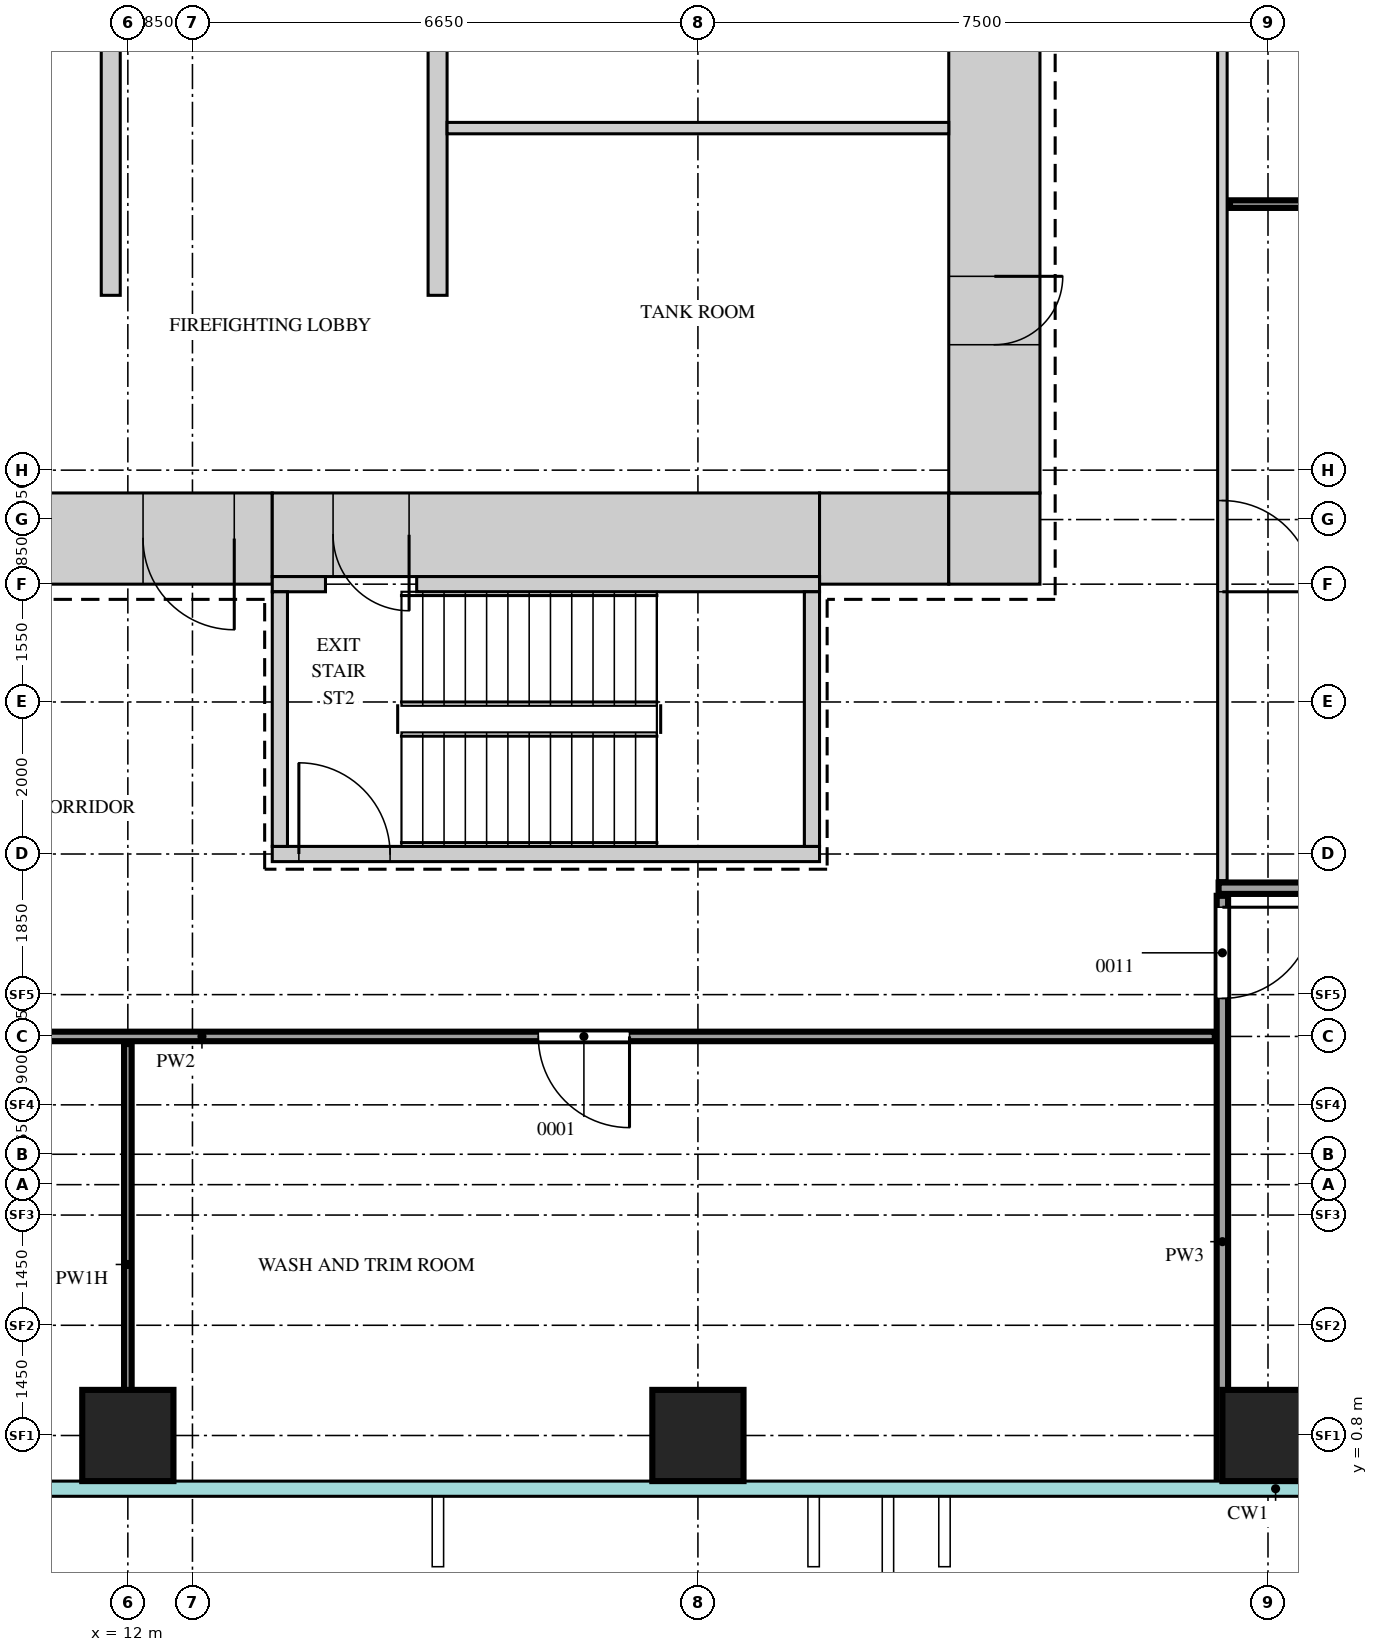
"""IFC4 building model, lengths in metres.
Left out: names, types, materials, properties, quantities, classifications, styles, units other than length and angle.
Written with IfcOpenShell. Run it as: python <this file> out.ifc"""

import sys

from ifc_helpers import new_model, si_unit, direction, frame, frame_2d, origin, origin_2d, place, context, subcontext, project, spatial, rectangle, extrude, source, transform, mapped, element, fill, save


model = new_model("IFC4")
c1 = context("Model", 3, precision=1e-05, world=origin(), true_north=direction((0.0, 1.0)))
c2 = subcontext(c1, "Body", "Model", "MODEL_VIEW")
j1 = project(units=[si_unit("LENGTHUNIT", "METRE"), si_unit("PLANEANGLEUNIT", "RADIAN")], contexts=[c1])
p1 = place(None, origin())
s1 = spatial("IfcSite", under=j1, at=p1, CompositionType="ELEMENT")
p2 = place(p1, origin())
s2 = spatial("IfcBuilding", under=s1, at=p2, CompositionType="ELEMENT")
p3 = place(p2, frame((0.0, 0.0, 33.0)))
s3 = spatial("IfcBuildingStorey", under=s2, at=p3, CompositionType="ELEMENT", Elevation=33.0)
m1 = source(origin(), c2, "Body", "SweptSolid", [
    extrude(rectangle(XDim=6.7, YDim=1.2, at=frame_2d((3.35, 0.0))), origin(), (0.0, 0.0, 1.0), 4.2),
])
p4 = place(p3, frame((7.2, 12.6, 0.0), z_axis=(0.0, 0.0, 1.0), x_axis=(1.0, 0.0, 0.0)))
e1 = element("IfcWall", 1, at=p4, inside=s3, PredefinedType="SHEAR", context=c2, shape_type="MappedRepresentation", body=[
    mapped(m1, transform((0.0, 0.0, 0.0))),
])
m2 = source(origin(), c2, "Body", "SweptSolid", [
    extrude(rectangle(XDim=1.2, YDim=2.1, at=frame_2d((0.6, 1.05))), frame((0.0, 0.61, 0.0), z_axis=(0.0, -1.0, 0.0), x_axis=(1.0, 0.0, 0.0)), (0.0, 0.0, 1.0), 1.22),
])
p5 = place(p4, frame((5.0, 0.0, 0.0)))
e2 = element("IfcOpeningElement", 2, at=p5, cuts=e1, PredefinedType="OPENING", context=c2, shape_type="MappedRepresentation", body=[
    mapped(m2, transform((0.0, 0.0, 0.0))),
])
p6 = place(p4, frame((1.65, 0.0, 0.0)))
e3 = element("IfcOpeningElement", 3, at=p6, cuts=e1, PredefinedType="OPENING", context=c2, shape_type="MappedRepresentation", body=[
    mapped(m2, transform((0.0, 0.0, 0.0))),
])
m3 = source(origin(), c2, "Body", "SweptSolid", [
    extrude(rectangle(XDim=7.2, YDim=1.1, at=frame_2d((3.6, 0.0))), origin(), (0.0, 0.0, 1.0), 4.2),
])
p7 = place(p3, frame((13.9, 12.65, 0.0), z_axis=(0.0, 0.0, 1.0), x_axis=(1.0, 0.0, 0.0)))
e4 = element("IfcWall", 4, at=p7, inside=s3, PredefinedType="SHEAR", context=c2, shape_type="MappedRepresentation", body=[
    mapped(m3, transform((0.0, 0.0, 0.0))),
])
m4 = source(origin(), c2, "Body", "SweptSolid", [
    extrude(rectangle(XDim=1.0, YDim=2.1, at=frame_2d((0.5, 1.05))), frame((0.0, 0.56, 0.0), z_axis=(0.0, -1.0, 0.0), x_axis=(1.0, 0.0, 0.0)), (0.0, 0.0, 1.0), 1.12),
])
p8 = place(p7, frame((0.8, 0.0, 0.0)))
e5 = element("IfcOpeningElement", 5, at=p8, cuts=e4, PredefinedType="OPENING", context=c2, shape_type="MappedRepresentation", body=[
    mapped(m4, transform((0.0, 0.0, 0.0))),
])
m5 = source(origin(), c2, "Body", "SweptSolid", [
    extrude(rectangle(XDim=1.7, YDim=1.2, at=frame_2d((0.85, 0.0))), origin(), (0.0, 0.0, 1.0), 4.2),
])
p9 = place(p3, frame((21.1, 12.6, 0.0), z_axis=(0.0, 0.0, 1.0), x_axis=(1.0, 0.0, 0.0)))
e6 = element("IfcWall", 6, at=p9, inside=s3, PredefinedType="SHEAR", context=c2, shape_type="MappedRepresentation", body=[
    mapped(m5, transform((0.0, 0.0, 0.0))),
])
m6 = source(origin(), c2, "Body", "SweptSolid", [
    extrude(rectangle(XDim=1.2, YDim=1.2, at=frame_2d((0.6, 0.0))), origin(), (0.0, 0.0, 1.0), 4.2),
])
p10 = place(p3, frame((22.8, 12.6, 0.0), z_axis=(0.0, 0.0, 1.0), x_axis=(1.0, 0.0, 0.0)))
e7 = element("IfcWall", 7, at=p10, inside=s3, PredefinedType="SHEAR", context=c2, shape_type="MappedRepresentation", body=[
    mapped(m6, transform((0.0, 0.0, 0.0))),
])
m7 = source(origin(), c2, "Body", "SweptSolid", [
    extrude(rectangle(XDim=27.6, YDim=1.2, at=frame_2d((13.8, 0.0))), origin(), (0.0, 0.0, 1.0), 4.2),
])
p11 = place(p3, frame((23.4, 13.2, 0.0), z_axis=(0.0, 0.0, 1.0), x_axis=(0.0, 1.0, 0.0)))
e8 = element("IfcWall", 8, at=p11, inside=s3, PredefinedType="SHEAR", context=c2, shape_type="MappedRepresentation", body=[
    mapped(m7, transform((0.0, 0.0, 0.0))),
])
m8 = source(origin(), c2, "Body", "SweptSolid", [
    extrude(rectangle(XDim=1.8, YDim=2.1, at=frame_2d((0.9, 1.05))), frame((0.0, 0.61, 0.0), z_axis=(0.0, -1.0, 0.0), x_axis=(1.0, 0.0, 0.0)), (0.0, 0.0, 1.0), 1.22),
])
p12 = place(p11, frame((22.4, 0.0, 0.0)))
e9 = element("IfcOpeningElement", 9, at=p12, cuts=e8, PredefinedType="OPENING", context=c2, shape_type="MappedRepresentation", body=[
    mapped(m8, transform((0.0, 0.0, 0.0))),
])
p13 = place(p11, frame((13.65, 0.0, 0.0)))
e10 = element("IfcOpeningElement", 10, at=p13, cuts=e8, PredefinedType="OPENING", context=c2, shape_type="MappedRepresentation", body=[
    mapped(m2, transform((0.0, 0.0, 0.0))),
])
m9 = source(origin(), c2, "Body", "SweptSolid", [
    extrude(rectangle(XDim=0.9, YDim=2.1, at=frame_2d((0.45, 1.05))), frame((0.0, 0.61, 0.0), z_axis=(0.0, -1.0, 0.0), x_axis=(1.0, 0.0, 0.0)), (0.0, 0.0, 1.0), 1.22),
])
p14 = place(p11, frame((1.95, 0.0, 0.0)))
e11 = element("IfcOpeningElement", 11, at=p14, cuts=e8, PredefinedType="OPENING", context=c2, shape_type="MappedRepresentation", body=[
    mapped(m9, transform((0.0, 0.0, 0.0))),
])
p15 = place(p11, frame((6.8, 0.0, 0.0)))
e12 = element("IfcOpeningElement", 12, at=p15, cuts=e8, PredefinedType="OPENING", context=c2, shape_type="MappedRepresentation", body=[
    mapped(m9, transform((0.0, 0.0, 0.0))),
])
m10 = source(origin(), c2, "Body", "SweptSolid", [
    extrude(rectangle(XDim=0.7, YDim=0.2, at=frame_2d((0.35, 0.0))), origin(), (0.0, 0.0, 1.0), 4.2),
])
p16 = place(p3, frame((13.9, 12.0, 0.0), z_axis=(0.0, 0.0, 1.0), x_axis=(1.0, 0.0, 0.0)))
e13 = element("IfcWall", 13, at=p16, inside=s3, PredefinedType="SHEAR", context=c2, shape_type="MappedRepresentation", body=[
    mapped(m10, transform((0.0, 0.0, 0.0))),
])
m11 = source(origin(), c2, "Body", "SweptSolid", [
    extrude(rectangle(XDim=5.3, YDim=0.2, at=frame_2d((2.65, 0.0))), origin(), (0.0, 0.0, 1.0), 4.2),
])
p17 = place(p3, frame((15.8, 12.0, 0.0), z_axis=(0.0, 0.0, 1.0), x_axis=(1.0, 0.0, 0.0)))
e14 = element("IfcWall", 14, at=p17, inside=s3, PredefinedType="SHEAR", context=c2, shape_type="MappedRepresentation", body=[
    mapped(m11, transform((0.0, 0.0, 0.0))),
])
m12 = source(origin(), c2, "Body", "SweptSolid", [
    extrude(rectangle(XDim=7.2, YDim=0.2, at=frame_2d((3.6, 0.0))), origin(), (0.0, 0.0, 1.0), 4.2),
])
p18 = place(p3, frame((13.9, 8.45, 0.0), z_axis=(0.0, 0.0, 1.0), x_axis=(1.0, 0.0, 0.0)))
e15 = element("IfcWall", 15, at=p18, inside=s3, PredefinedType="SHEAR", context=c2, shape_type="MappedRepresentation", body=[
    mapped(m12, transform((0.0, 0.0, 0.0))),
])
m13 = source(origin(), c2, "Body", "SweptSolid", [
    extrude(rectangle(XDim=1.2, YDim=2.1, at=frame_2d((0.6, 1.05))), frame((0.0, 0.11, 0.0), z_axis=(0.0, -1.0, 0.0), x_axis=(1.0, 0.0, 0.0)), (0.0, 0.0, 1.0), 0.22),
])
p19 = place(p18, frame((0.35, 0.0, 0.0)))
e16 = element("IfcOpeningElement", 16, at=p19, cuts=e15, PredefinedType="OPENING", context=c2, shape_type="MappedRepresentation", body=[
    mapped(m13, transform((0.0, 0.0, 0.0))),
])
m14 = source(origin(), c2, "Body", "SweptSolid", [
    extrude(rectangle(XDim=3.35, YDim=0.2, at=frame_2d((1.675, 0.0))), origin(), (0.0, 0.0, 1.0), 4.2),
])
for number, where, z_axis, x_axis in (
    (17, (21.0, 8.55, 0.0), (0.0, 0.0, 1.0), (0.0, 1.0, 0.0)),
    (18, (14.0, 8.55, 0.0), (0.0, 0.0, 1.0), (0.0, 1.0, 0.0)),
):
    element("IfcWall", number, at=place(p3, frame(where, z_axis=z_axis, x_axis=x_axis)), inside=s3, PredefinedType="SHEAR", context=c2, shape_type="MappedRepresentation", body=[
        mapped(m14, transform((0.0, 0.0, 0.0))),
    ])
m15 = source(origin(), c2, "Body", "SweptSolid", [
    extrude(rectangle(XDim=3.4, YDim=0.25, at=frame_2d((1.7, 0.0))), origin(), (0.0, 0.0, 1.0), 4.2),
])
for number, where, z_axis, x_axis in (
    (19, (16.075, 15.8, 0.0), (0.0, 0.0, 1.0), (0.0, 1.0, 0.0)),
    (20, (11.775, 15.8, 0.0), (0.0, 0.0, 1.0), (0.0, 1.0, 0.0)),
):
    element("IfcWall", number, at=place(p3, frame(where, z_axis=z_axis, x_axis=x_axis)), inside=s3, PredefinedType="STANDARD", context=c2, shape_type="MappedRepresentation", body=[
        mapped(m15, transform((0.0, 0.0, 0.0))),
    ])
m16 = source(origin(), c2, "Body", "SweptSolid", [
    extrude(rectangle(XDim=1.2, YDim=1.2, at=origin_2d()), origin(), (0.0, 0.0, 1.0), 4.2),
])
for number, where, z_axis, x_axis in (
    (21, (12.0, 0.8, 0.0), (0.0, 0.0, 1.0), (1.0, 0.0, 0.0)),
    (22, (19.5, 0.8, 0.0), (0.0, 0.0, 1.0), (1.0, 0.0, 0.0)),
    (23, (27.0, 0.8, 0.0), (0.0, 0.0, 1.0), (1.0, 0.0, 0.0)),
):
    element("IfcColumn", number, at=place(p3, frame(where, z_axis=z_axis, x_axis=x_axis)), inside=s3, PredefinedType="COLUMN", context=c2, shape_type="MappedRepresentation", body=[
        mapped(m16, transform((0.0, 0.0, 0.0))),
    ])
m17 = source(origin(), c2, "Body", "SweptSolid", [
    extrude(rectangle(XDim=5.8, YDim=0.1, at=frame_2d((2.9, 0.0))), origin(), (0.0, 0.0, 1.0), 3.7),
])
p20 = place(p3, frame((12.0, 0.15, 0.0), z_axis=(0.0, 0.0, 1.0), x_axis=(0.0, 1.0, 0.0)))
e24 = element("IfcWall", 24, at=p20, inside=s3, PredefinedType="PARTITIONING", context=c2, shape_type="MappedRepresentation", body=[
    mapped(m17, transform((0.0, 0.0, 0.0))),
])
m18 = source(origin(), c2, "Body", "SweptSolid", [
    extrude(rectangle(XDim=7.75, YDim=0.15, at=frame_2d((3.875, 0.0))), origin(), (0.0, 0.0, 1.0), 4.3),
])
p21 = place(p3, frame((26.4, 0.15, 0.0), z_axis=(0.0, 0.0, 1.0), x_axis=(0.0, 1.0, 0.0)))
e25 = element("IfcWall", 25, at=p21, inside=s3, PredefinedType="PARTITIONING", context=c2, shape_type="MappedRepresentation", body=[
    mapped(m18, transform((0.0, 0.0, 0.0))),
])
m19 = source(origin(), c2, "Body", "SweptSolid", [
    extrude(rectangle(XDim=1.2, YDim=2.1, at=frame_2d((0.6, 1.05))), frame((0.0, 0.085, 0.0), z_axis=(0.0, -1.0, 0.0), x_axis=(1.0, 0.0, 0.0)), (0.0, 0.0, 1.0), 0.17),
])
p22 = place(p21, frame((6.4, 0.0, 0.0)))
e26 = element("IfcOpeningElement", 26, at=p22, cuts=e25, PredefinedType="OPENING", context=c2, shape_type="MappedRepresentation", body=[
    mapped(m19, transform((0.0, 0.0, 0.0))),
])
m20 = source(origin(), c2, "Body", "SweptSolid", [
    extrude(rectangle(XDim=22.15, YDim=0.125, at=frame_2d((11.075, 0.0))), origin(), (0.0, 0.0, 1.0), 4.3),
])
p23 = place(p3, frame((4.15, 6.05, 0.0), z_axis=(0.0, 0.0, 1.0), x_axis=(1.0, 0.0, 0.0)))
e27 = element("IfcWall", 27, at=p23, inside=s3, PredefinedType="PARTITIONING", context=c2, shape_type="MappedRepresentation", body=[
    mapped(m20, transform((0.0, 0.0, 0.0))),
])
m21 = source(origin(), c2, "Body", "SweptSolid", [
    extrude(rectangle(XDim=0.9, YDim=2.1, at=frame_2d((0.45, 1.05))), frame((0.0, 0.073, 0.0), z_axis=(0.0, -1.0, 0.0), x_axis=(1.0, 0.0, 0.0)), (0.0, 0.0, 1.0), 0.145),
])
p24 = place(p23, frame((3.5, 0.0, 0.0)))
e28 = element("IfcOpeningElement", 28, at=p24, cuts=e27, PredefinedType="OPENING", context=c2, shape_type="MappedRepresentation", body=[
    mapped(m21, transform((0.0, 0.0, 0.0))),
])
m22 = source(origin(), c2, "Body", "SweptSolid", [
    extrude(rectangle(XDim=1.2, YDim=2.1, at=frame_2d((0.6, 1.05))), frame((0.0, 0.073, 0.0), z_axis=(0.0, -1.0, 0.0), x_axis=(1.0, 0.0, 0.0)), (0.0, 0.0, 1.0), 0.145),
])
p25 = place(p23, frame((13.25, 0.0, 0.0)))
e29 = element("IfcOpeningElement", 29, at=p25, cuts=e27, PredefinedType="OPENING", context=c2, shape_type="MappedRepresentation", body=[
    mapped(m22, transform((0.0, 0.0, 0.0))),
])
m23 = source(origin(), c2, "Body", "SweptSolid", [
    extrude(rectangle(XDim=27.5, YDim=0.15, at=frame_2d((13.75, 0.0))), origin(), (0.0, 0.0, 1.0), 4.3),
])
p26 = place(p3, frame((26.35, 8.0, 0.0), z_axis=(0.0, 0.0, 1.0), x_axis=(1.0, 0.0, 0.0)))
e30 = element("IfcWall", 30, at=p26, inside=s3, PredefinedType="PARTITIONING", context=c2, shape_type="MappedRepresentation", body=[
    mapped(m23, transform((0.0, 0.0, 0.0))),
])
m24 = source(origin(), c2, "Body", "SweptSolid", [
    extrude(rectangle(XDim=27.1, YDim=0.125, at=frame_2d((13.55, 0.0))), origin(), (0.0, 0.0, 1.0), 4.3),
])
p27 = place(p3, frame((26.4, 8.1, 0.0), z_axis=(0.0, 0.0, 1.0), x_axis=(0.0, 1.0, 0.0)))
e31 = element("IfcWall", 31, at=p27, inside=s3, PredefinedType="PARTITIONING", context=c2, shape_type="MappedRepresentation", body=[
    mapped(m24, transform((0.0, 0.0, 0.0))),
])
p28 = place(p27, frame((3.8, 0.0, 0.0)))
e32 = element("IfcOpeningElement", 32, at=p28, cuts=e31, PredefinedType="OPENING", context=c2, shape_type="MappedRepresentation", body=[
    mapped(m22, transform((0.0, 0.0, 0.0))),
])
p29 = place(p27, frame((12.8, 0.0, 0.0)))
e33 = element("IfcOpeningElement", 33, at=p29, cuts=e31, PredefinedType="OPENING", context=c2, shape_type="MappedRepresentation", body=[
    mapped(m22, transform((0.0, 0.0, 0.0))),
])
m25 = source(origin(), c2, "Body", "SweptSolid", [
    extrude(rectangle(XDim=27.35, YDim=0.1, at=frame_2d((13.675, 0.0))), origin(), (0.0, 0.0, 1.0), 4.3),
])
p30 = place(p3, frame((26.5, 17.0, 0.0), z_axis=(0.0, 0.0, 1.0), x_axis=(1.0, 0.0, 0.0)))
e34 = element("IfcWall", 34, at=p30, inside=s3, PredefinedType="PARTITIONING", context=c2, shape_type="MappedRepresentation", body=[
    mapped(m25, transform((0.0, 0.0, 0.0))),
])
m26 = source(origin(), c2, "Body", "SweptSolid", [
    extrude(rectangle(XDim=6.6, YDim=0.15, at=frame_2d((3.3, 0.0))), origin(), (0.0, 0.0, 1.0), 4.3),
])
p31 = place(p3, frame((16.2, 18.0, 0.0), z_axis=(0.0, 0.0, 1.0), x_axis=(1.0, 0.0, 0.0)))
e35 = element("IfcWall", 35, at=p31, inside=s3, PredefinedType="PARTITIONING", context=c2, shape_type="MappedRepresentation", body=[
    mapped(m26, transform((0.0, 0.0, 0.0))),
])
m27 = source(origin(), c2, "Body", "SweptSolid", [
    extrude(rectangle(XDim=0.9, YDim=2.1, at=frame_2d((0.45, 1.05))), frame((0.0, 0.55, 0.0), z_axis=(0.0, -1.0, 0.0), x_axis=(1.0, 0.0, 0.0)), (0.0, 0.0, 1.0), 1.1),
])
p32 = place(p14, origin())
e36 = element("IfcDoor", 36, at=p32, inside=s3, OperationType="SINGLE_SWING_RIGHT", PredefinedType="DOOR", context=c2, shape_type="MappedRepresentation", body=[
    mapped(m27, transform((0.0, 0.0, 0.0))),
])
fill(e11, e36)
m28 = source(origin(), c2, "Body", "SweptSolid", [
    extrude(rectangle(XDim=1.2, YDim=2.1, at=frame_2d((0.6, 1.05))), frame((0.0, 0.55, 0.0), z_axis=(0.0, -1.0, 0.0), x_axis=(1.0, 0.0, 0.0)), (0.0, 0.0, 1.0), 1.1),
])
p33 = place(p5, origin())
e37 = element("IfcDoor", 37, at=p33, inside=s3, OperationType="SINGLE_SWING_RIGHT", PredefinedType="DOOR", context=c2, shape_type="MappedRepresentation", body=[
    mapped(m28, transform((0.0, 0.0, 0.0))),
])
fill(e2, e37)
m29 = source(origin(), c2, "Body", "SweptSolid", [
    extrude(rectangle(XDim=1.0, YDim=2.1, at=frame_2d((0.5, 1.05))), frame((0.0, 0.5, 0.0), z_axis=(0.0, -1.0, 0.0), x_axis=(1.0, 0.0, 0.0)), (0.0, 0.0, 1.0), 1.0),
])
p34 = place(p8, origin())
e38 = element("IfcDoor", 38, at=p34, inside=s3, OperationType="SINGLE_SWING_RIGHT", PredefinedType="DOOR", context=c2, shape_type="MappedRepresentation", body=[
    mapped(m29, transform((0.0, 0.0, 0.0))),
])
fill(e5, e38)
m30 = source(origin(), c2, "Body", "SweptSolid", [
    extrude(rectangle(XDim=1.2, YDim=2.1, at=frame_2d((0.6, 1.05))), frame((0.0, 0.025, 0.0), z_axis=(0.0, -1.0, 0.0), x_axis=(1.0, 0.0, 0.0)), (0.0, 0.0, 1.0), 0.05),
])
p35 = place(p22, origin())
e39 = element("IfcDoor", 39, at=p35, inside=s3, OperationType="SINGLE_SWING_RIGHT", PredefinedType="DOOR", context=c2, shape_type="MappedRepresentation", body=[
    mapped(m30, transform((0.0, 0.0, 0.0))),
])
fill(e26, e39)
p36 = place(p28, origin())
e40 = element("IfcDoor", 40, at=p36, inside=s3, OperationType="SINGLE_SWING_LEFT", PredefinedType="DOOR", context=c2, shape_type="MappedRepresentation", body=[
    mapped(m30, transform((0.0, 0.0, 0.0))),
])
fill(e32, e40)
p37 = place(p25, origin())
e41 = element("IfcDoor", 41, at=p37, inside=s3, OperationType="SINGLE_SWING_RIGHT", PredefinedType="DOOR", context=c2, shape_type="MappedRepresentation", body=[
    mapped(m30, transform((0.0, 0.0, 0.0))),
])
fill(e29, e41)
p38 = place(p19, origin())
e42 = element("IfcDoor", 42, at=p38, inside=s3, OperationType="SINGLE_SWING_RIGHT", PredefinedType="DOOR", context=c2, shape_type="MappedRepresentation", body=[
    mapped(m30, transform((0.0, 0.0, 0.0))),
])
fill(e16, e42)
save(model, sys.argv[1])
